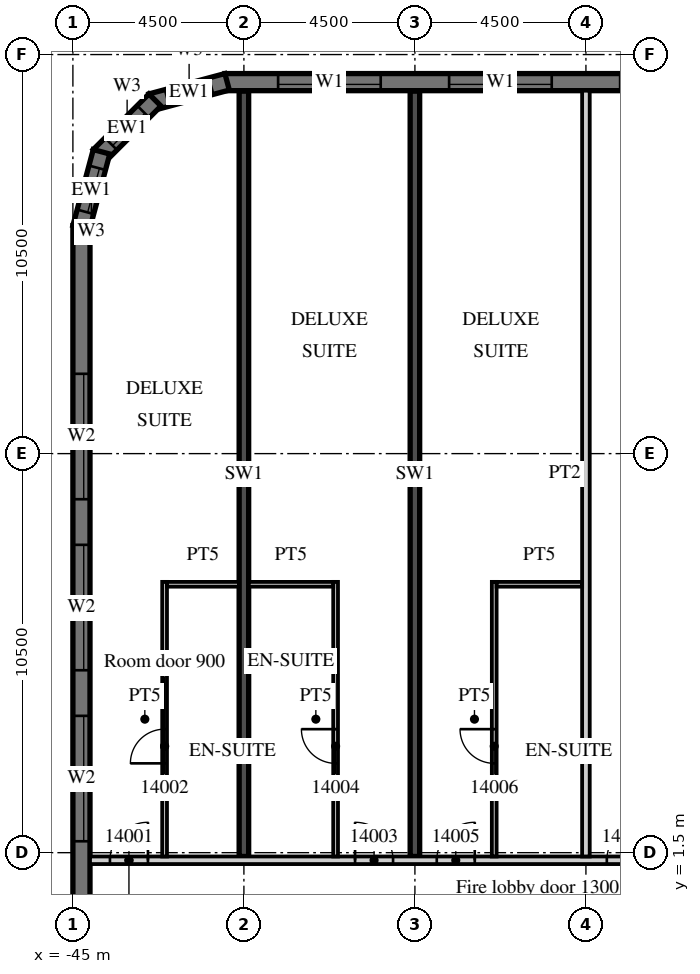
"""IFC4 building model, lengths in metres.
Left out: names, types, materials, properties, quantities, classifications, styles, units other than length and angle.
Written with IfcOpenShell. Run it as: python <this file> out.ifc"""

import sys

from ifc_helpers import new_model, si_unit, direction, frame, frame_2d, origin, place, context, subcontext, project, spatial, polyline, rectangle, outline, extrude, element, fill, save


model = new_model("IFC4")
c1 = context("Model", 3, precision=1e-05, world=origin(), true_north=direction((0.0, 1.0)))
c2 = subcontext(c1, "Body", "Model", "MODEL_VIEW")
j1 = project(units=[si_unit("LENGTHUNIT", "METRE"), si_unit("PLANEANGLEUNIT", "RADIAN")], contexts=[c1])
p1 = place(None, origin())
s1 = spatial("IfcSite", under=j1, at=p1, CompositionType="ELEMENT")
p2 = place(p1, origin())
s2 = spatial("IfcBuilding", under=s1, at=p2, CompositionType="ELEMENT")
p3 = place(p2, frame((0.0, 0.0, 76.5)))
s3 = spatial("IfcBuildingStorey", under=s2, at=p3, CompositionType="ELEMENT", Elevation=76.5)
for number, where, z_axis, x_axis in (
    (1, (-40.5, 1.4, 0.0), (0.0, 0.0, 1.0), (0.0, 1.0, 0.0)),
    (2, (-36.0, 1.4, 0.0), (0.0, 0.0, 1.0), (0.0, 1.0, 0.0)),
):
    element("IfcWall", number, at=place(p3, frame(where, z_axis=z_axis, x_axis=x_axis)), inside=s3, PredefinedType="SHEAR", context=c2, shape_type="SweptSolid", body=[
        extrude(rectangle(XDim=20.14, YDim=0.25, at=frame_2d((10.07, 0.0))), origin(), (0.0, 0.0, 1.0), 3.3),
    ])
p4 = place(p3, frame((13.5, 21.775, 0.0), z_axis=(0.0, 0.0, 1.0), x_axis=(-1.0, 0.0, 0.0)))
e3 = element("IfcWall", 3, at=p4, inside=s3, PredefinedType="SOLIDWALL", context=c2, shape_type="SweptSolid", body=[
    extrude(rectangle(XDim=54.5, YDim=0.45, at=frame_2d((27.25, 0.0))), origin(), (0.0, 0.0, 1.0), 3.02),
])
p5 = place(p4, frame((0.9, 0.0, 0.45)))
e4 = element("IfcOpeningElement", 4, at=p5, cuts=e3, PredefinedType="OPENING", context=c2, shape_type="SweptSolid", body=[
    extrude(rectangle(XDim=2.7, YDim=2.25, at=frame_2d((1.35, 1.125))), frame((0.0, 0.235, 0.0), z_axis=(0.0, -1.0, 0.0), x_axis=(1.0, 0.0, 0.0)), (0.0, 0.0, 1.0), 0.47),
])
p6 = place(p4, frame((5.4, 0.0, 0.45)))
e5 = element("IfcOpeningElement", 5, at=p6, cuts=e3, PredefinedType="OPENING", context=c2, shape_type="SweptSolid", body=[
    extrude(rectangle(XDim=2.7, YDim=2.25, at=frame_2d((1.35, 1.125))), frame((0.0, 0.235, 0.0), z_axis=(0.0, -1.0, 0.0), x_axis=(1.0, 0.0, 0.0)), (0.0, 0.0, 1.0), 0.47),
])
p7 = place(p4, frame((9.9, 0.0, 0.45)))
e6 = element("IfcOpeningElement", 6, at=p7, cuts=e3, PredefinedType="OPENING", context=c2, shape_type="SweptSolid", body=[
    extrude(rectangle(XDim=2.7, YDim=2.25, at=frame_2d((1.35, 1.125))), frame((0.0, 0.235, 0.0), z_axis=(0.0, -1.0, 0.0), x_axis=(1.0, 0.0, 0.0)), (0.0, 0.0, 1.0), 0.47),
])
p8 = place(p4, frame((14.4, 0.0, 0.45)))
e7 = element("IfcOpeningElement", 7, at=p8, cuts=e3, PredefinedType="OPENING", context=c2, shape_type="SweptSolid", body=[
    extrude(rectangle(XDim=2.7, YDim=2.25, at=frame_2d((1.35, 1.125))), frame((0.0, 0.235, 0.0), z_axis=(0.0, -1.0, 0.0), x_axis=(1.0, 0.0, 0.0)), (0.0, 0.0, 1.0), 0.47),
])
p9 = place(p4, frame((18.9, 0.0, 0.45)))
e8 = element("IfcOpeningElement", 8, at=p9, cuts=e3, PredefinedType="OPENING", context=c2, shape_type="SweptSolid", body=[
    extrude(rectangle(XDim=2.7, YDim=2.25, at=frame_2d((1.35, 1.125))), frame((0.0, 0.235, 0.0), z_axis=(0.0, -1.0, 0.0), x_axis=(1.0, 0.0, 0.0)), (0.0, 0.0, 1.0), 0.47),
])
p10 = place(p4, frame((23.4, 0.0, 0.45)))
e9 = element("IfcOpeningElement", 9, at=p10, cuts=e3, PredefinedType="OPENING", context=c2, shape_type="SweptSolid", body=[
    extrude(rectangle(XDim=2.7, YDim=2.25, at=frame_2d((1.35, 1.125))), frame((0.0, 0.235, 0.0), z_axis=(0.0, -1.0, 0.0), x_axis=(1.0, 0.0, 0.0)), (0.0, 0.0, 1.0), 0.47),
])
p11 = place(p4, frame((27.9, 0.0, 0.45)))
e10 = element("IfcOpeningElement", 10, at=p11, cuts=e3, PredefinedType="OPENING", context=c2, shape_type="SweptSolid", body=[
    extrude(rectangle(XDim=2.7, YDim=2.25, at=frame_2d((1.35, 1.125))), frame((0.0, 0.235, 0.0), z_axis=(0.0, -1.0, 0.0), x_axis=(1.0, 0.0, 0.0)), (0.0, 0.0, 1.0), 0.47),
])
p12 = place(p4, frame((32.4, 0.0, 0.45)))
e11 = element("IfcOpeningElement", 11, at=p12, cuts=e3, PredefinedType="OPENING", context=c2, shape_type="SweptSolid", body=[
    extrude(rectangle(XDim=2.7, YDim=2.25, at=frame_2d((1.35, 1.125))), frame((0.0, 0.235, 0.0), z_axis=(0.0, -1.0, 0.0), x_axis=(1.0, 0.0, 0.0)), (0.0, 0.0, 1.0), 0.47),
])
p13 = place(p4, frame((36.9, 0.0, 0.45)))
e12 = element("IfcOpeningElement", 12, at=p13, cuts=e3, PredefinedType="OPENING", context=c2, shape_type="SweptSolid", body=[
    extrude(rectangle(XDim=2.7, YDim=2.25, at=frame_2d((1.35, 1.125))), frame((0.0, 0.235, 0.0), z_axis=(0.0, -1.0, 0.0), x_axis=(1.0, 0.0, 0.0)), (0.0, 0.0, 1.0), 0.47),
])
p14 = place(p4, frame((41.4, 0.0, 0.45)))
e13 = element("IfcOpeningElement", 13, at=p14, cuts=e3, PredefinedType="OPENING", context=c2, shape_type="SweptSolid", body=[
    extrude(rectangle(XDim=2.7, YDim=2.25, at=frame_2d((1.35, 1.125))), frame((0.0, 0.235, 0.0), z_axis=(0.0, -1.0, 0.0), x_axis=(1.0, 0.0, 0.0)), (0.0, 0.0, 1.0), 0.47),
])
p15 = place(p4, frame((45.9, 0.0, 0.45)))
e14 = element("IfcOpeningElement", 14, at=p15, cuts=e3, PredefinedType="OPENING", context=c2, shape_type="SweptSolid", body=[
    extrude(rectangle(XDim=2.7, YDim=2.25, at=frame_2d((1.35, 1.125))), frame((0.0, 0.235, 0.0), z_axis=(0.0, -1.0, 0.0), x_axis=(1.0, 0.0, 0.0)), (0.0, 0.0, 1.0), 0.47),
])
p16 = place(p4, frame((50.4, 0.0, 0.45)))
e15 = element("IfcOpeningElement", 15, at=p16, cuts=e3, PredefinedType="OPENING", context=c2, shape_type="SweptSolid", body=[
    extrude(rectangle(XDim=2.7, YDim=2.25, at=frame_2d((1.35, 1.125))), frame((0.0, 0.235, 0.0), z_axis=(0.0, -1.0, 0.0), x_axis=(1.0, 0.0, 0.0)), (0.0, 0.0, 1.0), 0.47),
])
p17 = place(p3, frame((-40.942, 21.783, 0.0), z_axis=(0.0, 0.0, 1.0), x_axis=(-0.965926999034, -0.25881466832, 0.0)))
e16 = element("IfcWall", 16, at=p17, inside=s3, PredefinedType="SOLIDWALL", context=c2, shape_type="SweptSolid", body=[
    extrude(outline(polyline([(0.0, -0.225), (2.071, -0.225), (1.95, 0.225), (0.121, 0.225), (0.0, -0.225)])), origin(), (0.0, 0.0, 1.0), 3.02),
])
p18 = place(p17, frame((0.435, 0.0, 0.45)))
e17 = element("IfcOpeningElement", 17, at=p18, cuts=e16, PredefinedType="OPENING", context=c2, shape_type="SweptSolid", body=[
    extrude(rectangle(XDim=1.2, YDim=2.25, at=frame_2d((0.6, 1.125))), frame((0.0, 0.235, 0.0), z_axis=(0.0, -1.0, 0.0), x_axis=(1.0, 0.0, 0.0)), (0.0, 0.0, 1.0), 0.47),
])
p19 = place(p3, frame((-42.841, 21.305, 0.0), z_axis=(0.0, 0.0, 1.0), x_axis=(-0.707106781187, -0.707106781187, 0.0)))
e18 = element("IfcWall", 18, at=p19, inside=s3, PredefinedType="SOLIDWALL", context=c2, shape_type="SweptSolid", body=[
    extrude(outline(polyline([(0.0, -0.225), (2.071, -0.225), (1.95, 0.225), (0.121, 0.225), (0.0, -0.225)])), origin(), (0.0, 0.0, 1.0), 3.02),
])
p20 = place(p19, frame((0.435, 0.0, 0.45)))
e19 = element("IfcOpeningElement", 19, at=p20, cuts=e18, PredefinedType="OPENING", context=c2, shape_type="SweptSolid", body=[
    extrude(rectangle(XDim=1.2, YDim=2.25, at=frame_2d((0.6, 1.125))), frame((0.0, 0.235, 0.0), z_axis=(0.0, -1.0, 0.0), x_axis=(1.0, 0.0, 0.0)), (0.0, 0.0, 1.0), 0.47),
])
p21 = place(p3, frame((-44.247, 19.942, 0.0), z_axis=(0.0, 0.0, 1.0), x_axis=(-0.25881466832, -0.965926999034, 0.0)))
e20 = element("IfcWall", 20, at=p21, inside=s3, PredefinedType="SOLIDWALL", context=c2, shape_type="SweptSolid", body=[
    extrude(outline(polyline([(-0.0, -0.225), (2.07, -0.225), (1.95, 0.225), (0.12, 0.225), (-0.0, -0.225)])), origin(), (0.0, 0.0, 1.0), 3.02),
])
p22 = place(p21, frame((0.435, 0.0, 0.45)))
e21 = element("IfcOpeningElement", 21, at=p22, cuts=e20, PredefinedType="OPENING", context=c2, shape_type="SweptSolid", body=[
    extrude(rectangle(XDim=1.2, YDim=2.25, at=frame_2d((0.6, 1.125))), frame((0.0, 0.235, 0.0), z_axis=(0.0, -1.0, 0.0), x_axis=(1.0, 0.0, 0.0)), (0.0, 0.0, 1.0), 0.47),
])
p23 = place(p3, frame((-44.775, 18.0, 0.0), z_axis=(0.0, 0.0, 1.0), x_axis=(0.0, -1.0, 0.0)))
e22 = element("IfcWall", 22, at=p23, inside=s3, PredefinedType="SOLIDWALL", context=c2, shape_type="SweptSolid", body=[
    extrude(rectangle(XDim=36.0, YDim=0.45, at=frame_2d((18.0, 0.0))), origin(), (0.0, 0.0, 1.0), 3.02),
])
p24 = place(p23, frame((3.9, 0.0, 0.45)))
e23 = element("IfcOpeningElement", 23, at=p24, cuts=e22, PredefinedType="OPENING", context=c2, shape_type="SweptSolid", body=[
    extrude(rectangle(XDim=3.3, YDim=2.25, at=frame_2d((1.65, 1.125))), frame((0.0, 0.235, 0.0), z_axis=(0.0, -1.0, 0.0), x_axis=(1.0, 0.0, 0.0)), (0.0, 0.0, 1.0), 0.47),
])
p25 = place(p23, frame((8.4, 0.0, 0.45)))
e24 = element("IfcOpeningElement", 24, at=p25, cuts=e22, PredefinedType="OPENING", context=c2, shape_type="SweptSolid", body=[
    extrude(rectangle(XDim=3.3, YDim=2.25, at=frame_2d((1.65, 1.125))), frame((0.0, 0.235, 0.0), z_axis=(0.0, -1.0, 0.0), x_axis=(1.0, 0.0, 0.0)), (0.0, 0.0, 1.0), 0.47),
])
p26 = place(p23, frame((12.9, 0.0, 0.45)))
e25 = element("IfcOpeningElement", 25, at=p26, cuts=e22, PredefinedType="OPENING", context=c2, shape_type="SweptSolid", body=[
    extrude(rectangle(XDim=3.3, YDim=2.25, at=frame_2d((1.65, 1.125))), frame((0.0, 0.235, 0.0), z_axis=(0.0, -1.0, 0.0), x_axis=(1.0, 0.0, 0.0)), (0.0, 0.0, 1.0), 0.47),
])
p27 = place(p3, frame((-44.55, 1.3, 0.0), z_axis=(0.0, 0.0, 1.0), x_axis=(1.0, 0.0, 0.0)))
e26 = element("IfcWall", 26, at=p27, inside=s3, PredefinedType="PARTITIONING", context=c2, shape_type="SweptSolid", body=[
    extrude(rectangle(XDim=58.05, YDim=0.2, at=frame_2d((29.025, 0.0))), origin(), (0.0, 0.0, 1.0), 3.02),
])
p28 = place(p27, frame((0.525, 0.0, 0.0)))
e27 = element("IfcOpeningElement", 27, at=p28, cuts=e26, PredefinedType="OPENING", context=c2, shape_type="SweptSolid", body=[
    extrude(rectangle(XDim=1.0, YDim=2.1, at=frame_2d((0.5, 1.05))), frame((0.0, 0.11, 0.0), z_axis=(0.0, -1.0, 0.0), x_axis=(1.0, 0.0, 0.0)), (0.0, 0.0, 1.0), 0.22),
])
p29 = place(p27, frame((6.975, 0.0, 0.0)))
e28 = element("IfcOpeningElement", 28, at=p29, cuts=e26, PredefinedType="OPENING", context=c2, shape_type="SweptSolid", body=[
    extrude(rectangle(XDim=1.0, YDim=2.1, at=frame_2d((0.5, 1.05))), frame((0.0, 0.11, 0.0), z_axis=(0.0, -1.0, 0.0), x_axis=(1.0, 0.0, 0.0)), (0.0, 0.0, 1.0), 0.22),
])
p30 = place(p27, frame((9.125, 0.0, 0.0)))
e29 = element("IfcOpeningElement", 29, at=p30, cuts=e26, PredefinedType="OPENING", context=c2, shape_type="SweptSolid", body=[
    extrude(rectangle(XDim=1.0, YDim=2.1, at=frame_2d((0.5, 1.05))), frame((0.0, 0.11, 0.0), z_axis=(0.0, -1.0, 0.0), x_axis=(1.0, 0.0, 0.0)), (0.0, 0.0, 1.0), 0.22),
])
p31 = place(p27, frame((13.6, 0.0, 0.0)))
e30 = element("IfcOpeningElement", 30, at=p31, cuts=e26, PredefinedType="OPENING", context=c2, shape_type="SweptSolid", body=[
    extrude(rectangle(XDim=1.0, YDim=2.1, at=frame_2d((0.5, 1.05))), frame((0.0, 0.11, 0.0), z_axis=(0.0, -1.0, 0.0), x_axis=(1.0, 0.0, 0.0)), (0.0, 0.0, 1.0), 0.22),
])
p32 = place(p27, frame((19.987, 0.0, 0.0)))
e31 = element("IfcOpeningElement", 31, at=p32, cuts=e26, PredefinedType="OPENING", context=c2, shape_type="SweptSolid", body=[
    extrude(rectangle(XDim=1.2, YDim=2.1, at=frame_2d((0.6, 1.05))), frame((0.0, 0.11, 0.0), z_axis=(0.0, -1.0, 0.0), x_axis=(1.0, 0.0, 0.0)), (0.0, 0.0, 1.0), 0.22),
])
p33 = place(p27, frame((31.912, 0.0, 0.0)))
e32 = element("IfcOpeningElement", 32, at=p33, cuts=e26, PredefinedType="OPENING", context=c2, shape_type="SweptSolid", body=[
    extrude(rectangle(XDim=1.2, YDim=2.1, at=frame_2d((0.6, 1.05))), frame((0.0, 0.11, 0.0), z_axis=(0.0, -1.0, 0.0), x_axis=(1.0, 0.0, 0.0)), (0.0, 0.0, 1.0), 0.22),
])
p34 = place(p27, frame((38.5, 0.0, 0.0)))
e33 = element("IfcOpeningElement", 33, at=p34, cuts=e26, PredefinedType="OPENING", context=c2, shape_type="SweptSolid", body=[
    extrude(rectangle(XDim=1.0, YDim=2.1, at=frame_2d((0.5, 1.05))), frame((0.0, 0.11, 0.0), z_axis=(0.0, -1.0, 0.0), x_axis=(1.0, 0.0, 0.0)), (0.0, 0.0, 1.0), 0.22),
])
p35 = place(p27, frame((40.6, 0.0, 0.0)))
e34 = element("IfcOpeningElement", 34, at=p35, cuts=e26, PredefinedType="OPENING", context=c2, shape_type="SweptSolid", body=[
    extrude(rectangle(XDim=1.0, YDim=2.1, at=frame_2d((0.5, 1.05))), frame((0.0, 0.11, 0.0), z_axis=(0.0, -1.0, 0.0), x_axis=(1.0, 0.0, 0.0)), (0.0, 0.0, 1.0), 0.22),
])
p36 = place(p27, frame((47.5, 0.0, 0.0)))
e35 = element("IfcOpeningElement", 35, at=p36, cuts=e26, PredefinedType="OPENING", context=c2, shape_type="SweptSolid", body=[
    extrude(rectangle(XDim=1.0, YDim=2.1, at=frame_2d((0.5, 1.05))), frame((0.0, 0.11, 0.0), z_axis=(0.0, -1.0, 0.0), x_axis=(1.0, 0.0, 0.0)), (0.0, 0.0, 1.0), 0.22),
])
p37 = place(p27, frame((51.975, 0.0, 0.0)))
e36 = element("IfcOpeningElement", 36, at=p37, cuts=e26, PredefinedType="OPENING", context=c2, shape_type="SweptSolid", body=[
    extrude(rectangle(XDim=1.0, YDim=2.1, at=frame_2d((0.5, 1.05))), frame((0.0, 0.11, 0.0), z_axis=(0.0, -1.0, 0.0), x_axis=(1.0, 0.0, 0.0)), (0.0, 0.0, 1.0), 0.22),
])
p38 = place(p27, frame((56.475, 0.0, 0.0)))
e37 = element("IfcOpeningElement", 37, at=p38, cuts=e26, PredefinedType="OPENING", context=c2, shape_type="SweptSolid", body=[
    extrude(rectangle(XDim=1.0, YDim=2.1, at=frame_2d((0.5, 1.05))), frame((0.0, 0.11, 0.0), z_axis=(0.0, -1.0, 0.0), x_axis=(1.0, 0.0, 0.0)), (0.0, 0.0, 1.0), 0.22),
])
p39 = place(p3, frame((-42.587, 1.4, 0.0), z_axis=(0.0, 0.0, 1.0), x_axis=(0.0, 1.0, 0.0)))
e38 = element("IfcWall", 38, at=p39, inside=s3, PredefinedType="PARTITIONING", context=c2, shape_type="SweptSolid", body=[
    extrude(rectangle(XDim=7.225, YDim=0.125, at=frame_2d((3.613, 0.0))), origin(), (0.0, 0.0, 1.0), 3.02),
])
p40 = place(p39, frame((2.45, 0.0, 0.0)))
e39 = element("IfcOpeningElement", 39, at=p40, cuts=e38, PredefinedType="OPENING", context=c2, shape_type="SweptSolid", body=[
    extrude(rectangle(XDim=0.9, YDim=2.1, at=frame_2d((0.45, 1.05))), frame((0.0, 0.073, 0.0), z_axis=(0.0, -1.0, 0.0), x_axis=(1.0, 0.0, 0.0)), (0.0, 0.0, 1.0), 0.145),
])
p41 = place(p3, frame((-42.525, 8.562, 0.0), z_axis=(0.0, 0.0, 1.0), x_axis=(1.0, 0.0, 0.0)))
e40 = element("IfcWall", 40, at=p41, inside=s3, PredefinedType="PARTITIONING", context=c2, shape_type="SweptSolid", body=[
    extrude(rectangle(XDim=1.9, YDim=0.125, at=frame_2d((0.95, 0.0))), origin(), (0.0, 0.0, 1.0), 3.02),
])
p42 = place(p3, frame((-38.087, 1.4, 0.0), z_axis=(0.0, 0.0, 1.0), x_axis=(0.0, 1.0, 0.0)))
e41 = element("IfcWall", 41, at=p42, inside=s3, PredefinedType="PARTITIONING", context=c2, shape_type="SweptSolid", body=[
    extrude(rectangle(XDim=7.225, YDim=0.125, at=frame_2d((3.613, 0.0))), origin(), (0.0, 0.0, 1.0), 3.02),
])
p43 = place(p42, frame((2.45, 0.0, 0.0)))
e42 = element("IfcOpeningElement", 42, at=p43, cuts=e41, PredefinedType="OPENING", context=c2, shape_type="SweptSolid", body=[
    extrude(rectangle(XDim=0.9, YDim=2.1, at=frame_2d((0.45, 1.05))), frame((0.0, 0.073, 0.0), z_axis=(0.0, -1.0, 0.0), x_axis=(1.0, 0.0, 0.0)), (0.0, 0.0, 1.0), 0.145),
])
p44 = place(p3, frame((-40.375, 8.562, 0.0), z_axis=(0.0, 0.0, 1.0), x_axis=(1.0, 0.0, 0.0)))
e43 = element("IfcWall", 43, at=p44, inside=s3, PredefinedType="PARTITIONING", context=c2, shape_type="SweptSolid", body=[
    extrude(rectangle(XDim=2.225, YDim=0.125, at=frame_2d((1.113, 0.0))), origin(), (0.0, 0.0, 1.0), 3.02),
])
p45 = place(p3, frame((-31.5, 1.4, 0.0), z_axis=(0.0, 0.0, 1.0), x_axis=(0.0, 1.0, 0.0)))
e44 = element("IfcWall", 44, at=p45, inside=s3, PredefinedType="PARTITIONING", context=c2, shape_type="SweptSolid", body=[
    extrude(rectangle(XDim=20.15, YDim=0.2, at=frame_2d((10.075, 0.0))), origin(), (0.0, 0.0, 1.0), 3.02),
])
p46 = place(p3, frame((-33.913, 1.4, 0.0), z_axis=(0.0, 0.0, 1.0), x_axis=(0.0, 1.0, 0.0)))
e45 = element("IfcWall", 45, at=p46, inside=s3, PredefinedType="PARTITIONING", context=c2, shape_type="SweptSolid", body=[
    extrude(rectangle(XDim=7.225, YDim=0.125, at=frame_2d((3.613, 0.0))), origin(), (0.0, 0.0, 1.0), 3.02),
])
p47 = place(p46, frame((2.45, 0.0, 0.0)))
e46 = element("IfcOpeningElement", 46, at=p47, cuts=e45, PredefinedType="OPENING", context=c2, shape_type="SweptSolid", body=[
    extrude(rectangle(XDim=0.9, YDim=2.1, at=frame_2d((0.45, 1.05))), frame((0.0, 0.073, 0.0), z_axis=(0.0, -1.0, 0.0), x_axis=(1.0, 0.0, 0.0)), (0.0, 0.0, 1.0), 0.145),
])
p48 = place(p3, frame((-33.85, 8.562, 0.0), z_axis=(0.0, 0.0, 1.0), x_axis=(1.0, 0.0, 0.0)))
e47 = element("IfcWall", 47, at=p48, inside=s3, PredefinedType="PARTITIONING", context=c2, shape_type="SweptSolid", body=[
    extrude(rectangle(XDim=2.25, YDim=0.125, at=frame_2d((1.125, 0.0))), origin(), (0.0, 0.0, 1.0), 3.02),
])
p49 = place(p15, origin())
e48 = element("IfcWindow", 48, at=p49, inside=s3, PartitioningType="SINGLE_PANEL", PredefinedType="WINDOW", context=c2, shape_type="SweptSolid", body=[
    extrude(rectangle(XDim=2.7, YDim=2.25, at=frame_2d((1.35, 1.125))), frame((0.0, 0.09, 0.0), z_axis=(0.0, -1.0, 0.0), x_axis=(1.0, 0.0, 0.0)), (0.0, 0.0, 1.0), 0.06),
])
fill(e14, e48)
p50 = place(p16, origin())
e49 = element("IfcWindow", 49, at=p50, inside=s3, PartitioningType="SINGLE_PANEL", PredefinedType="WINDOW", context=c2, shape_type="SweptSolid", body=[
    extrude(rectangle(XDim=2.7, YDim=2.25, at=frame_2d((1.35, 1.125))), frame((0.0, 0.09, 0.0), z_axis=(0.0, -1.0, 0.0), x_axis=(1.0, 0.0, 0.0)), (0.0, 0.0, 1.0), 0.06),
])
fill(e15, e49)
p51 = place(p18, origin())
e50 = element("IfcWindow", 50, at=p51, inside=s3, PartitioningType="SINGLE_PANEL", PredefinedType="WINDOW", context=c2, shape_type="SweptSolid", body=[
    extrude(rectangle(XDim=1.2, YDim=2.25, at=frame_2d((0.6, 1.125))), frame((0.0, 0.09, 0.0), z_axis=(0.0, -1.0, 0.0), x_axis=(1.0, 0.0, 0.0)), (0.0, 0.0, 1.0), 0.06),
])
fill(e17, e50)
p52 = place(p20, origin())
e51 = element("IfcWindow", 51, at=p52, inside=s3, PartitioningType="SINGLE_PANEL", PredefinedType="WINDOW", context=c2, shape_type="SweptSolid", body=[
    extrude(rectangle(XDim=1.2, YDim=2.25, at=frame_2d((0.6, 1.125))), frame((0.0, 0.09, 0.0), z_axis=(0.0, -1.0, 0.0), x_axis=(1.0, 0.0, 0.0)), (0.0, 0.0, 1.0), 0.06),
])
fill(e19, e51)
p53 = place(p22, origin())
e52 = element("IfcWindow", 52, at=p53, inside=s3, PartitioningType="SINGLE_PANEL", PredefinedType="WINDOW", context=c2, shape_type="SweptSolid", body=[
    extrude(rectangle(XDim=1.2, YDim=2.25, at=frame_2d((0.6, 1.125))), frame((0.0, 0.09, 0.0), z_axis=(0.0, -1.0, 0.0), x_axis=(1.0, 0.0, 0.0)), (0.0, 0.0, 1.0), 0.06),
])
fill(e21, e52)
p54 = place(p24, origin())
e53 = element("IfcWindow", 53, at=p54, inside=s3, PartitioningType="SINGLE_PANEL", PredefinedType="WINDOW", context=c2, shape_type="SweptSolid", body=[
    extrude(rectangle(XDim=3.3, YDim=2.25, at=frame_2d((1.65, 1.125))), frame((0.0, 0.09, 0.0), z_axis=(0.0, -1.0, 0.0), x_axis=(1.0, 0.0, 0.0)), (0.0, 0.0, 1.0), 0.06),
])
fill(e23, e53)
p55 = place(p25, origin())
e54 = element("IfcWindow", 54, at=p55, inside=s3, PartitioningType="SINGLE_PANEL", PredefinedType="WINDOW", context=c2, shape_type="SweptSolid", body=[
    extrude(rectangle(XDim=3.3, YDim=2.25, at=frame_2d((1.65, 1.125))), frame((0.0, 0.09, 0.0), z_axis=(0.0, -1.0, 0.0), x_axis=(1.0, 0.0, 0.0)), (0.0, 0.0, 1.0), 0.06),
])
fill(e24, e54)
p56 = place(p26, origin())
e55 = element("IfcWindow", 55, at=p56, inside=s3, PartitioningType="SINGLE_PANEL", PredefinedType="WINDOW", context=c2, shape_type="SweptSolid", body=[
    extrude(rectangle(XDim=3.3, YDim=2.25, at=frame_2d((1.65, 1.125))), frame((0.0, 0.09, 0.0), z_axis=(0.0, -1.0, 0.0), x_axis=(1.0, 0.0, 0.0)), (0.0, 0.0, 1.0), 0.06),
])
fill(e25, e55)
p57 = place(p28, origin())
e56 = element("IfcDoor", 56, at=p57, inside=s3, OperationType="SINGLE_SWING_RIGHT", PredefinedType="DOOR", context=c2, shape_type="SweptSolid", body=[
    extrude(rectangle(XDim=1.0, YDim=2.1, at=frame_2d((0.5, 1.05))), frame((0.0, 0.025, 0.0), z_axis=(0.0, -1.0, 0.0), x_axis=(1.0, 0.0, 0.0)), (0.0, 0.0, 1.0), 0.05),
])
fill(e27, e56)
p58 = place(p40, origin())
e57 = element("IfcDoor", 57, at=p58, inside=s3, OperationType="SINGLE_SWING_LEFT", PredefinedType="DOOR", context=c2, shape_type="SweptSolid", body=[
    extrude(rectangle(XDim=0.9, YDim=2.1, at=frame_2d((0.45, 1.05))), frame((0.0, 0.025, 0.0), z_axis=(0.0, -1.0, 0.0), x_axis=(1.0, 0.0, 0.0)), (0.0, 0.0, 1.0), 0.05),
])
fill(e39, e57)
p59 = place(p29, origin())
e58 = element("IfcDoor", 58, at=p59, inside=s3, OperationType="SINGLE_SWING_LEFT", PredefinedType="DOOR", context=c2, shape_type="SweptSolid", body=[
    extrude(rectangle(XDim=1.0, YDim=2.1, at=frame_2d((0.5, 1.05))), frame((0.0, 0.025, 0.0), z_axis=(0.0, -1.0, 0.0), x_axis=(1.0, 0.0, 0.0)), (0.0, 0.0, 1.0), 0.05),
])
fill(e28, e58)
p60 = place(p43, origin())
e59 = element("IfcDoor", 59, at=p60, inside=s3, OperationType="SINGLE_SWING_RIGHT", PredefinedType="DOOR", context=c2, shape_type="SweptSolid", body=[
    extrude(rectangle(XDim=0.9, YDim=2.1, at=frame_2d((0.45, 1.05))), frame((0.0, 0.025, 0.0), z_axis=(0.0, -1.0, 0.0), x_axis=(1.0, 0.0, 0.0)), (0.0, 0.0, 1.0), 0.05),
])
fill(e42, e59)
p61 = place(p30, origin())
e60 = element("IfcDoor", 60, at=p61, inside=s3, OperationType="SINGLE_SWING_RIGHT", PredefinedType="DOOR", context=c2, shape_type="SweptSolid", body=[
    extrude(rectangle(XDim=1.0, YDim=2.1, at=frame_2d((0.5, 1.05))), frame((0.0, 0.025, 0.0), z_axis=(0.0, -1.0, 0.0), x_axis=(1.0, 0.0, 0.0)), (0.0, 0.0, 1.0), 0.05),
])
fill(e29, e60)
p62 = place(p47, origin())
e61 = element("IfcDoor", 61, at=p62, inside=s3, OperationType="SINGLE_SWING_RIGHT", PredefinedType="DOOR", context=c2, shape_type="SweptSolid", body=[
    extrude(rectangle(XDim=0.9, YDim=2.1, at=frame_2d((0.45, 1.05))), frame((0.0, 0.025, 0.0), z_axis=(0.0, -1.0, 0.0), x_axis=(1.0, 0.0, 0.0)), (0.0, 0.0, 1.0), 0.05),
])
fill(e46, e61)
p63 = place(p31, origin())
e62 = element("IfcDoor", 62, at=p63, inside=s3, OperationType="SINGLE_SWING_RIGHT", PredefinedType="DOOR", context=c2, shape_type="SweptSolid", body=[
    extrude(rectangle(XDim=1.0, YDim=2.1, at=frame_2d((0.5, 1.05))), frame((0.0, 0.025, 0.0), z_axis=(0.0, -1.0, 0.0), x_axis=(1.0, 0.0, 0.0)), (0.0, 0.0, 1.0), 0.05),
])
fill(e30, e62)
save(model, sys.argv[1])
